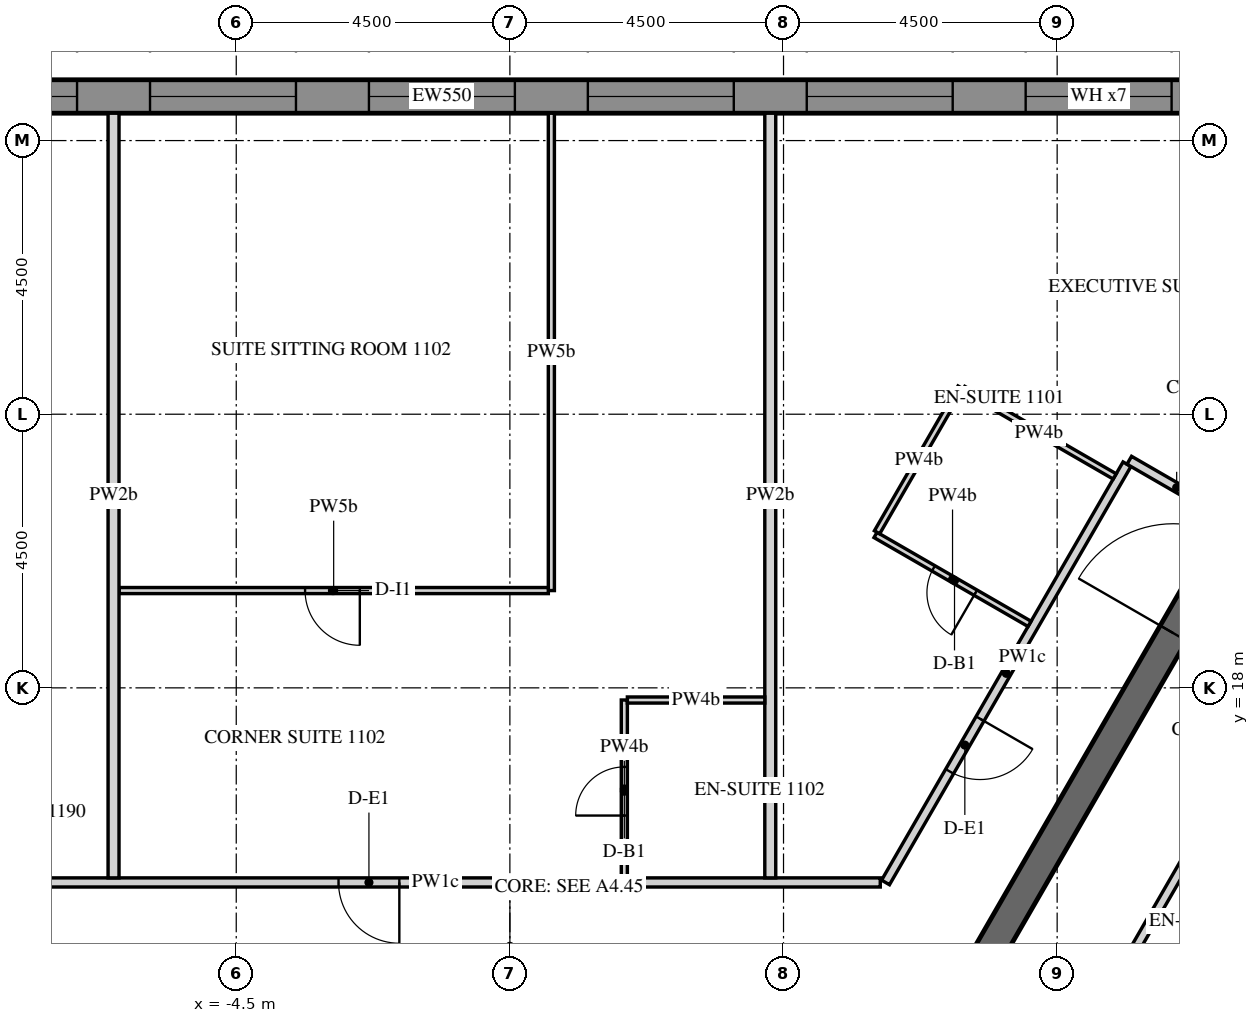
"""IFC4 building model, lengths in metres.
Left out: names, types, materials, properties, quantities, classifications, styles, units other than length and angle.
Written with IfcOpenShell. Run it as: python <this file> out.ifc"""

import sys

from ifc_helpers import new_model, si_unit, direction, frame, frame_2d, origin, place, context, subcontext, project, spatial, polyline, rectangle, outline, extrude, element, fill, save


model = new_model("IFC4")
c1 = context("Model", 3, precision=1e-05, world=origin(), true_north=direction((0.0, 1.0)))
c2 = subcontext(c1, "Body", "Model", "MODEL_VIEW")
j1 = project(units=[si_unit("LENGTHUNIT", "METRE"), si_unit("PLANEANGLEUNIT", "RADIAN")], contexts=[c1])
p1 = place(None, origin())
s1 = spatial("IfcSite", under=j1, at=p1, CompositionType="ELEMENT")
p2 = place(p1, origin())
s2 = spatial("IfcBuilding", under=s1, at=p2, CompositionType="ELEMENT")
p3 = place(p2, frame((0.0, 0.0, 156.6)))
s3 = spatial("IfcBuildingStorey", under=s2, at=p3, CompositionType="ELEMENT", Elevation=156.6)
p4 = place(p3, frame((12.761, 27.725, -0.15), z_axis=(0.0, 0.0, 1.0), x_axis=(-1.0, 0.0, 0.0)))
e1 = element("IfcWall", 1, at=p4, inside=s3, PredefinedType="SOLIDWALL", context=c2, shape_type="SweptSolid", body=[
    extrude(outline(polyline([(-0.022, -0.275), (27.783, -0.275), (27.732, 0.275), (0.022, 0.275), (-0.022, -0.275)])), origin(), (0.0, 0.0, 1.0), 3.9),
])
p5 = place(p4, frame((1.879, 0.0, 1.05)))
e2 = element("IfcOpeningElement", 2, at=p5, cuts=e1, PredefinedType="OPENING", context=c2, shape_type="SweptSolid", body=[
    extrude(rectangle(XDim=2.4, YDim=2.4, at=frame_2d((1.2, 1.2))), frame((0.0, 0.285, 0.0), z_axis=(0.0, -1.0, 0.0), x_axis=(1.0, 0.0, 0.0)), (0.0, 0.0, 1.0), 0.57),
])
p6 = place(p4, frame((5.479, 0.0, 1.05)))
e3 = element("IfcOpeningElement", 3, at=p6, cuts=e1, PredefinedType="OPENING", context=c2, shape_type="SweptSolid", body=[
    extrude(rectangle(XDim=2.4, YDim=2.4, at=frame_2d((1.2, 1.2))), frame((0.0, 0.285, 0.0), z_axis=(0.0, -1.0, 0.0), x_axis=(1.0, 0.0, 0.0)), (0.0, 0.0, 1.0), 0.57),
])
p7 = place(p4, frame((9.079, 0.0, 1.05)))
e4 = element("IfcOpeningElement", 4, at=p7, cuts=e1, PredefinedType="OPENING", context=c2, shape_type="SweptSolid", body=[
    extrude(rectangle(XDim=2.4, YDim=2.4, at=frame_2d((1.2, 1.2))), frame((0.0, 0.285, 0.0), z_axis=(0.0, -1.0, 0.0), x_axis=(1.0, 0.0, 0.0)), (0.0, 0.0, 1.0), 0.57),
])
p8 = place(p4, frame((12.679, 0.0, 1.05)))
e5 = element("IfcOpeningElement", 5, at=p8, cuts=e1, PredefinedType="OPENING", context=c2, shape_type="SweptSolid", body=[
    extrude(rectangle(XDim=2.4, YDim=2.4, at=frame_2d((1.2, 1.2))), frame((0.0, 0.285, 0.0), z_axis=(0.0, -1.0, 0.0), x_axis=(1.0, 0.0, 0.0)), (0.0, 0.0, 1.0), 0.57),
])
p9 = place(p4, frame((16.279, 0.0, 1.05)))
e6 = element("IfcOpeningElement", 6, at=p9, cuts=e1, PredefinedType="OPENING", context=c2, shape_type="SweptSolid", body=[
    extrude(rectangle(XDim=2.4, YDim=2.4, at=frame_2d((1.2, 1.2))), frame((0.0, 0.285, 0.0), z_axis=(0.0, -1.0, 0.0), x_axis=(1.0, 0.0, 0.0)), (0.0, 0.0, 1.0), 0.57),
])
p10 = place(p4, frame((19.879, 0.0, 1.05)))
e7 = element("IfcOpeningElement", 7, at=p10, cuts=e1, PredefinedType="OPENING", context=c2, shape_type="SweptSolid", body=[
    extrude(rectangle(XDim=2.4, YDim=2.4, at=frame_2d((1.2, 1.2))), frame((0.0, 0.285, 0.0), z_axis=(0.0, -1.0, 0.0), x_axis=(1.0, 0.0, 0.0)), (0.0, 0.0, 1.0), 0.57),
])
p11 = place(p4, frame((23.479, 0.0, 1.05)))
e8 = element("IfcOpeningElement", 8, at=p11, cuts=e1, PredefinedType="OPENING", context=c2, shape_type="SweptSolid", body=[
    extrude(rectangle(XDim=2.4, YDim=2.4, at=frame_2d((1.2, 1.2))), frame((0.0, 0.285, 0.0), z_axis=(0.0, -1.0, 0.0), x_axis=(1.0, 0.0, 0.0)), (0.0, 0.0, 1.0), 0.57),
])
p12 = place(p3, frame((7.506, 13.0, -0.15), z_axis=(0.0, 0.0, 1.0), x_axis=(0.499988271576, 0.866032175087, 0.0)))
e9 = element("IfcWall", 9, at=p12, inside=s3, PredefinedType="SHEAR", context=c2, shape_type="SweptSolid", body=[
    extrude(rectangle(XDim=15.424, YDim=0.5, at=frame_2d((7.712, 0.0))), origin(), (0.0, 0.0, 1.0), 3.9),
])
p13 = place(p12, frame((6.812, 0.0, 0.15)))
e10 = element("IfcOpeningElement", 10, at=p13, cuts=e9, PredefinedType="OPENING", context=c2, shape_type="SweptSolid", body=[
    extrude(rectangle(XDim=1.8, YDim=2.4, at=frame_2d((0.9, 1.2))), frame((0.0, 0.26, 0.0), z_axis=(0.0, -1.0, 0.0), x_axis=(1.0, 0.0, 0.0)), (0.0, 0.0, 1.0), 0.52),
])
p14 = place(p3, frame((10.149, 21.678, 0.0), z_axis=(0.0, 0.0, 1.0), x_axis=(-0.499997422768, -0.866026891745, 0.0)))
e11 = element("IfcWall", 11, at=p14, inside=s3, PredefinedType="PARTITIONING", context=c2, shape_type="SweptSolid", body=[
    extrude(rectangle(XDim=7.942, YDim=0.15, at=frame_2d((3.971, 0.0))), origin(), (0.0, 0.0, 1.0), 2.823),
])
p15 = place(p14, frame((4.833, 0.0, 0.0)))
e12 = element("IfcOpeningElement", 12, at=p15, cuts=e11, PredefinedType="OPENING", context=c2, shape_type="SweptSolid", body=[
    extrude(rectangle(XDim=1.0, YDim=2.1, at=frame_2d((0.5, 1.05))), frame((0.0, 0.085, 0.0), z_axis=(0.0, -1.0, 0.0), x_axis=(1.0, 0.0, 0.0)), (0.0, 0.0, 1.0), 0.17),
])
p16 = place(p3, frame((6.091, 14.8, 0.0), z_axis=(0.0, 0.0, 1.0), x_axis=(-1.0, 0.0, 0.0)))
e13 = element("IfcWall", 13, at=p16, inside=s3, PredefinedType="PARTITIONING", context=c2, shape_type="SweptSolid", body=[
    extrude(rectangle(XDim=14.636, YDim=0.15, at=frame_2d((7.318, 0.0))), origin(), (0.0, 0.0, 1.0), 2.823),
])
p17 = place(p16, frame((7.909, 0.0, 0.0)))
e14 = element("IfcOpeningElement", 14, at=p17, cuts=e13, PredefinedType="OPENING", context=c2, shape_type="SweptSolid", body=[
    extrude(rectangle(XDim=1.0, YDim=2.1, at=frame_2d((0.5, 1.05))), frame((0.0, 0.085, 0.0), z_axis=(0.0, -1.0, 0.0), x_axis=(1.0, 0.0, 0.0)), (0.0, 0.0, 1.0), 0.17),
])
p18 = place(p3, frame((11.745, 20.843, 0.0), z_axis=(0.0, 0.0, 1.0), x_axis=(-0.865989075817, 0.500062916607, 0.0)))
e15 = element("IfcWall", 15, at=p18, inside=s3, PredefinedType="PARTITIONING", context=c2, shape_type="SweptSolid", body=[
    extrude(rectangle(XDim=1.8, YDim=0.15, at=frame_2d((0.9, 0.0))), origin(), (0.0, 0.0, 1.0), 2.823),
])
p19 = place(p3, frame((9.728, 12.75, 0.0), z_axis=(0.0, 0.0, 1.0), x_axis=(0.500007149838, 0.866021275784, 0.0)))
e16 = element("IfcWall", 16, at=p19, inside=s3, PredefinedType="PARTITIONING", context=c2, shape_type="SweptSolid", body=[
    extrude(rectangle(XDim=8.017, YDim=0.15, at=frame_2d((4.009, 0.0))), origin(), (0.0, 0.0, 1.0), 2.823),
])
p20 = place(p3, frame((8.546, 19.052, 0.0), z_axis=(0.0, 0.0, 1.0), x_axis=(-0.866046596414, 0.499963291492, 0.0)))
e17 = element("IfcWall", 17, at=p20, inside=s3, PredefinedType="PARTITIONING", context=c2, shape_type="SweptSolid", body=[
    extrude(rectangle(XDim=2.925, YDim=0.1, at=frame_2d((1.462, 0.0))), origin(), (0.0, 0.0, 1.0), 2.823),
])
p21 = place(p20, frame((1.025, 0.0, 0.0)))
e18 = element("IfcOpeningElement", 18, at=p21, cuts=e17, PredefinedType="OPENING", context=c2, shape_type="SweptSolid", body=[
    extrude(rectangle(XDim=0.8, YDim=2.1, at=frame_2d((0.4, 1.05))), frame((0.0, 0.06, 0.0), z_axis=(0.0, -1.0, 0.0), x_axis=(1.0, 0.0, 0.0)), (0.0, 0.0, 1.0), 0.12),
])
p22 = place(p3, frame((6.038, 20.558, 0.0), z_axis=(0.0, 0.0, 1.0), x_axis=(0.499996545922, 0.866027397988, 0.0)))
e19 = element("IfcWall", 19, at=p22, inside=s3, PredefinedType="PARTITIONING", context=c2, shape_type="SweptSolid", body=[
    extrude(rectangle(XDim=2.75, YDim=0.1, at=frame_2d((1.375, 0.0))), origin(), (0.0, 0.0, 1.0), 2.823),
])
p23 = place(p3, frame((7.456, 22.915, 0.0), z_axis=(0.0, 0.0, 1.0), x_axis=(0.866018712932, -0.500011588718, 0.0)))
e20 = element("IfcWall", 20, at=p23, inside=s3, PredefinedType="PARTITIONING", context=c2, shape_type="SweptSolid", body=[
    extrude(rectangle(XDim=2.875, YDim=0.1, at=frame_2d((1.438, 0.0))), origin(), (0.0, 0.0, 1.0), 2.823),
])
p24 = place(p3, frame((4.282, 27.45, 0.0), z_axis=(0.0, 0.0, 1.0), x_axis=(0.0, -1.0, 0.0)))
e21 = element("IfcWall", 21, at=p24, inside=s3, PredefinedType="PARTITIONING", context=c2, shape_type="SweptSolid", body=[
    extrude(rectangle(XDim=12.575, YDim=0.18, at=frame_2d((6.288, 0.0))), origin(), (0.0, 0.0, 1.0), 2.823),
])
p25 = place(p3, frame((1.882, 14.875, 0.0), z_axis=(0.0, 0.0, 1.0), x_axis=(0.0, 1.0, 0.0)))
e22 = element("IfcWall", 22, at=p25, inside=s3, PredefinedType="PARTITIONING", context=c2, shape_type="SweptSolid", body=[
    extrude(rectangle(XDim=2.925, YDim=0.1, at=frame_2d((1.462, 0.0))), origin(), (0.0, 0.0, 1.0), 2.823),
])
p26 = place(p25, frame((1.025, 0.0, 0.0)))
e23 = element("IfcOpeningElement", 23, at=p26, cuts=e22, PredefinedType="OPENING", context=c2, shape_type="SweptSolid", body=[
    extrude(rectangle(XDim=0.8, YDim=2.1, at=frame_2d((0.4, 1.05))), frame((0.0, 0.06, 0.0), z_axis=(0.0, -1.0, 0.0), x_axis=(1.0, 0.0, 0.0)), (0.0, 0.0, 1.0), 0.12),
])
p27 = place(p3, frame((1.932, 17.8, 0.0), z_axis=(0.0, 0.0, 1.0), x_axis=(1.0, 0.0, 0.0)))
e24 = element("IfcWall", 24, at=p27, inside=s3, PredefinedType="PARTITIONING", context=c2, shape_type="SweptSolid", body=[
    extrude(rectangle(XDim=2.26, YDim=0.1, at=frame_2d((1.13, 0.0))), origin(), (0.0, 0.0, 1.0), 2.823),
])
p28 = place(p3, frame((0.682, 27.45, 0.0), z_axis=(0.0, 0.0, 1.0), x_axis=(0.0, -1.0, 0.0)))
e25 = element("IfcWall", 25, at=p28, inside=s3, PredefinedType="PARTITIONING", context=c2, shape_type="SweptSolid", body=[
    extrude(rectangle(XDim=7.85, YDim=0.1, at=frame_2d((3.925, 0.0))), origin(), (0.0, 0.0, 1.0), 2.823),
])
p29 = place(p3, frame((0.632, 19.6, 0.0), z_axis=(0.0, 0.0, 1.0), x_axis=(-1.0, 0.0, 0.0)))
e26 = element("IfcWall", 26, at=p29, inside=s3, PredefinedType="PARTITIONING", context=c2, shape_type="SweptSolid", body=[
    extrude(rectangle(XDim=7.06, YDim=0.1, at=frame_2d((3.53, 0.0))), origin(), (0.0, 0.0, 1.0), 2.823),
])
p30 = place(p29, frame((3.1, 0.0, 0.0)))
e27 = element("IfcOpeningElement", 27, at=p30, cuts=e26, PredefinedType="OPENING", context=c2, shape_type="SweptSolid", body=[
    extrude(rectangle(XDim=0.9, YDim=2.1, at=frame_2d((0.45, 1.05))), frame((0.0, 0.06, 0.0), z_axis=(0.0, -1.0, 0.0), x_axis=(1.0, 0.0, 0.0)), (0.0, 0.0, 1.0), 0.12),
])
p31 = place(p3, frame((-6.518, 27.45, 0.0), z_axis=(0.0, 0.0, 1.0), x_axis=(0.0, -1.0, 0.0)))
e28 = element("IfcWall", 28, at=p31, inside=s3, PredefinedType="PARTITIONING", context=c2, shape_type="SweptSolid", body=[
    extrude(rectangle(XDim=12.575, YDim=0.18, at=frame_2d((6.288, 0.0))), origin(), (0.0, 0.0, 1.0), 2.823),
])
p32 = place(p3, frame((9.87, 12.846, 0.0), z_axis=(0.0, 0.0, 1.0), x_axis=(0.829045266323, 0.559181496821, 0.0)))
e29 = element("IfcWall", 29, at=p32, inside=s3, PredefinedType="PARTITIONING", context=c2, shape_type="SweptSolid", body=[
    extrude(rectangle(XDim=2.548, YDim=0.1, at=frame_2d((1.274, 0.0))), origin(), (0.0, 0.0, 1.0), 2.823),
])
p33 = place(p5, frame((0.0, 0.205, 0.0)))
e30 = element("IfcWindow", 30, at=p33, inside=s3, PartitioningType="DOUBLE_PANEL_VERTICAL", PredefinedType="WINDOW", context=c2, shape_type="SweptSolid", body=[
    extrude(rectangle(XDim=2.4, YDim=2.4, at=frame_2d((1.2, 1.2))), frame((0.0, 0.03, 0.0), z_axis=(0.0, -1.0, 0.0), x_axis=(1.0, 0.0, 0.0)), (0.0, 0.0, 1.0), 0.06),
])
fill(e2, e30)
p34 = place(p6, frame((0.0, 0.205, 0.0)))
e31 = element("IfcWindow", 31, at=p34, inside=s3, PartitioningType="DOUBLE_PANEL_VERTICAL", PredefinedType="WINDOW", context=c2, shape_type="SweptSolid", body=[
    extrude(rectangle(XDim=2.4, YDim=2.4, at=frame_2d((1.2, 1.2))), frame((0.0, 0.03, 0.0), z_axis=(0.0, -1.0, 0.0), x_axis=(1.0, 0.0, 0.0)), (0.0, 0.0, 1.0), 0.06),
])
fill(e3, e31)
p35 = place(p7, frame((0.0, 0.205, 0.0)))
e32 = element("IfcWindow", 32, at=p35, inside=s3, PartitioningType="DOUBLE_PANEL_VERTICAL", PredefinedType="WINDOW", context=c2, shape_type="SweptSolid", body=[
    extrude(rectangle(XDim=2.4, YDim=2.4, at=frame_2d((1.2, 1.2))), frame((0.0, 0.03, 0.0), z_axis=(0.0, -1.0, 0.0), x_axis=(1.0, 0.0, 0.0)), (0.0, 0.0, 1.0), 0.06),
])
fill(e4, e32)
p36 = place(p8, frame((0.0, 0.205, 0.0)))
e33 = element("IfcWindow", 33, at=p36, inside=s3, PartitioningType="DOUBLE_PANEL_VERTICAL", PredefinedType="WINDOW", context=c2, shape_type="SweptSolid", body=[
    extrude(rectangle(XDim=2.4, YDim=2.4, at=frame_2d((1.2, 1.2))), frame((0.0, 0.03, 0.0), z_axis=(0.0, -1.0, 0.0), x_axis=(1.0, 0.0, 0.0)), (0.0, 0.0, 1.0), 0.06),
])
fill(e5, e33)
p37 = place(p9, frame((0.0, 0.205, 0.0)))
e34 = element("IfcWindow", 34, at=p37, inside=s3, PartitioningType="DOUBLE_PANEL_VERTICAL", PredefinedType="WINDOW", context=c2, shape_type="SweptSolid", body=[
    extrude(rectangle(XDim=2.4, YDim=2.4, at=frame_2d((1.2, 1.2))), frame((0.0, 0.03, 0.0), z_axis=(0.0, -1.0, 0.0), x_axis=(1.0, 0.0, 0.0)), (0.0, 0.0, 1.0), 0.06),
])
fill(e6, e34)
p38 = place(p10, frame((0.0, 0.205, 0.0)))
e35 = element("IfcWindow", 35, at=p38, inside=s3, PartitioningType="DOUBLE_PANEL_VERTICAL", PredefinedType="WINDOW", context=c2, shape_type="SweptSolid", body=[
    extrude(rectangle(XDim=2.4, YDim=2.4, at=frame_2d((1.2, 1.2))), frame((0.0, 0.03, 0.0), z_axis=(0.0, -1.0, 0.0), x_axis=(1.0, 0.0, 0.0)), (0.0, 0.0, 1.0), 0.06),
])
fill(e7, e35)
p39 = place(p13, origin())
e36 = element("IfcDoor", 36, at=p39, inside=s3, OperationType="DOUBLE_DOOR_SINGLE_SWING", PredefinedType="DOOR", context=c2, shape_type="SweptSolid", body=[
    extrude(rectangle(XDim=1.8, YDim=2.4, at=frame_2d((0.9, 1.2))), frame((0.0, 0.025, 0.0), z_axis=(0.0, -1.0, 0.0), x_axis=(1.0, 0.0, 0.0)), (0.0, 0.0, 1.0), 0.05),
])
fill(e10, e36)
p40 = place(p15, origin())
e37 = element("IfcDoor", 37, at=p40, inside=s3, OperationType="SINGLE_SWING_LEFT", PredefinedType="DOOR", context=c2, shape_type="SweptSolid", body=[
    extrude(rectangle(XDim=1.0, YDim=2.1, at=frame_2d((0.5, 1.05))), frame((0.0, 0.025, 0.0), z_axis=(0.0, -1.0, 0.0), x_axis=(1.0, 0.0, 0.0)), (0.0, 0.0, 1.0), 0.05),
])
fill(e12, e37)
p41 = place(p21, origin())
e38 = element("IfcDoor", 38, at=p41, inside=s3, OperationType="SINGLE_SWING_RIGHT", PredefinedType="DOOR", context=c2, shape_type="SweptSolid", body=[
    extrude(rectangle(XDim=0.8, YDim=2.1, at=frame_2d((0.4, 1.05))), frame((0.0, 0.025, 0.0), z_axis=(0.0, -1.0, 0.0), x_axis=(1.0, 0.0, 0.0)), (0.0, 0.0, 1.0), 0.05),
])
fill(e18, e38)
p42 = place(p17, origin())
e39 = element("IfcDoor", 39, at=p42, inside=s3, OperationType="SINGLE_SWING_RIGHT", PredefinedType="DOOR", context=c2, shape_type="SweptSolid", body=[
    extrude(rectangle(XDim=1.0, YDim=2.1, at=frame_2d((0.5, 1.05))), frame((0.0, 0.025, 0.0), z_axis=(0.0, -1.0, 0.0), x_axis=(1.0, 0.0, 0.0)), (0.0, 0.0, 1.0), 0.05),
])
fill(e14, e39)
p43 = place(p26, origin())
e40 = element("IfcDoor", 40, at=p43, inside=s3, OperationType="SINGLE_SWING_RIGHT", PredefinedType="DOOR", context=c2, shape_type="SweptSolid", body=[
    extrude(rectangle(XDim=0.8, YDim=2.1, at=frame_2d((0.4, 1.05))), frame((0.0, 0.025, 0.0), z_axis=(0.0, -1.0, 0.0), x_axis=(1.0, 0.0, 0.0)), (0.0, 0.0, 1.0), 0.05),
])
fill(e23, e40)
p44 = place(p30, origin())
e41 = element("IfcDoor", 41, at=p44, inside=s3, OperationType="SINGLE_SWING_RIGHT", PredefinedType="DOOR", context=c2, shape_type="SweptSolid", body=[
    extrude(rectangle(XDim=0.9, YDim=2.1, at=frame_2d((0.45, 1.05))), frame((0.0, 0.025, 0.0), z_axis=(0.0, -1.0, 0.0), x_axis=(1.0, 0.0, 0.0)), (0.0, 0.0, 1.0), 0.05),
])
fill(e27, e41)
save(model, sys.argv[1])
